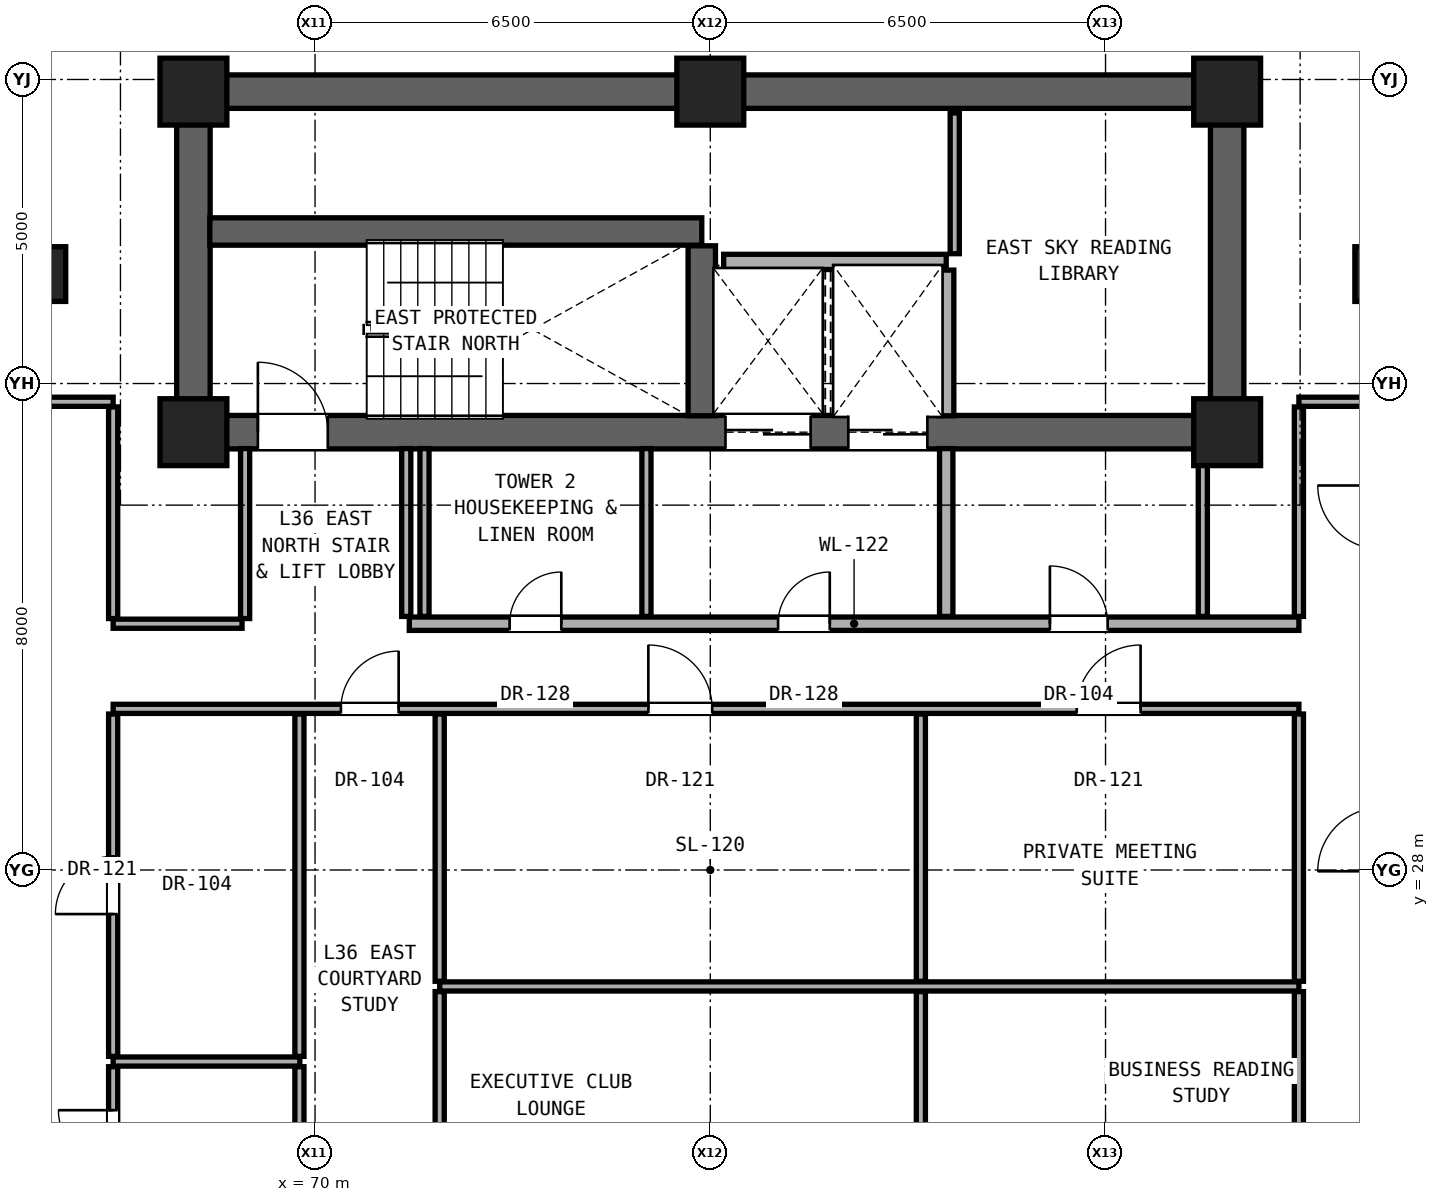
"""IFC4 building model, lengths in metres.
Left out: names, types, materials, properties, quantities, classifications, styles, units other than length and angle.
Written with IfcOpenShell. Run it as: python <this file> out.ifc"""

import sys

from ifc_helpers import new_model, si_unit, direction, frame, frame_2d, origin, origin_2d, place, context, subcontext, project, spatial, rectangle, extrude, element, fill, save


model = new_model("IFC4")
c1 = context("Model", 3, precision=1e-05, world=origin(), true_north=direction((0.0, 1.0)))
c2 = subcontext(c1, "Body", "Model", "MODEL_VIEW")
j1 = project(units=[si_unit("LENGTHUNIT", "METRE"), si_unit("PLANEANGLEUNIT", "RADIAN")], contexts=[c1])
p1 = place(None, origin())
s1 = spatial("IfcSite", under=j1, at=p1, CompositionType="ELEMENT")
p2 = place(p1, origin())
s2 = spatial("IfcBuilding", under=s1, at=p2, CompositionType="ELEMENT")
p3 = place(p2, frame((0.0, 0.0, 128.0)))
s3 = spatial("IfcBuildingStorey", under=s2, at=p3, CompositionType="ELEMENT", Elevation=128.0)
for number, where, z_axis, x_axis in (
    (1, (68.0, 35.2, 0.0), (0.0, 0.0, 1.0), (1.0, 0.0, 0.0)),
    (2, (85.0, 35.2, 0.0), (0.0, 0.0, 1.0), (1.0, 0.0, 0.0)),
    (3, (68.0, 40.8, 0.0), (0.0, 0.0, 1.0), (1.0, 0.0, 0.0)),
    (4, (76.5, 40.8, 0.0), (0.0, 0.0, 1.0), (1.0, 0.0, 0.0)),
    (5, (85.0, 40.8, 0.0), (0.0, 0.0, 1.0), (1.0, 0.0, 0.0)),
):
    element("IfcColumn", number, at=place(p3, frame(where, z_axis=z_axis, x_axis=x_axis)), inside=s3, PredefinedType="COLUMN", context=c2, shape_type="SweptSolid", body=[
        extrude(rectangle(XDim=1.1, YDim=1.1, at=origin_2d()), origin(), (0.0, 0.0, 1.0), 3.3),
    ])
for number, where, z_axis, x_axis in (
    (6, (65.6, 37.8, 0.0), (0.0, 0.0, 1.0), (1.0, 0.0, 0.0)),
    (7, (87.4, 37.8, 0.0), (0.0, 0.0, 1.0), (1.0, 0.0, 0.0)),
):
    element("IfcColumn", number, at=place(p3, frame(where, z_axis=z_axis, x_axis=x_axis)), inside=s3, PredefinedType="PILASTER", context=c2, shape_type="SweptSolid", body=[
        extrude(rectangle(XDim=0.6, YDim=0.9, at=origin_2d()), origin(), (0.0, 0.0, 1.0), 3.3),
    ])
p4 = place(p3, frame((68.0, 40.8, 0.0), z_axis=(0.0, 0.0, 1.0), x_axis=(1.0, 0.0, 0.0)))
e8 = element("IfcWall", 8, at=p4, inside=s3, PredefinedType="SHEAR", context=c2, shape_type="SweptSolid", body=[
    extrude(rectangle(XDim=17.0, YDim=0.55, at=frame_2d((8.5, 0.0))), origin(), (0.0, 0.0, 1.0), 3.08),
])
for number, where, z_axis, x_axis in (
    (9, (68.0, 35.2, 0.0), (0.0, 0.0, 1.0), (0.0, 1.0, 0.0)),
    (10, (85.0, 35.2, 0.0), (0.0, 0.0, 1.0), (0.0, 1.0, 0.0)),
):
    element("IfcWall", number, at=place(p3, frame(where, z_axis=z_axis, x_axis=x_axis)), inside=s3, PredefinedType="SHEAR", context=c2, shape_type="SweptSolid", body=[
        extrude(rectangle(XDim=5.6, YDim=0.55, at=frame_2d((2.8, 0.0))), origin(), (0.0, 0.0, 1.0), 3.08),
    ])
p5 = place(p3, frame((68.0, 35.2, 0.0), z_axis=(0.0, 0.0, 1.0), x_axis=(1.0, 0.0, 0.0)))
e11 = element("IfcWall", 11, at=p5, inside=s3, PredefinedType="SHEAR", context=c2, shape_type="SweptSolid", body=[
    extrude(rectangle(XDim=17.0, YDim=0.55, at=frame_2d((8.5, 0.0))), origin(), (0.0, 0.0, 1.0), 3.08),
])
p6 = place(p5, frame((1.06, 0.0, 0.0)))
e12 = element("IfcOpeningElement", 12, at=p6, cuts=e11, PredefinedType="OPENING", context=c2, shape_type="SweptSolid", body=[
    extrude(rectangle(XDim=1.15, YDim=2.2, at=frame_2d((0.575, 1.1))), frame((0.0, 0.285, 0.0), z_axis=(0.0, -1.0, 0.0), x_axis=(1.0, 0.0, 0.0)), (0.0, 0.0, 1.0), 0.57),
])
p7 = place(p5, frame((8.75, 0.0, 0.0)))
e13 = element("IfcOpeningElement", 13, at=p7, cuts=e11, PredefinedType="OPENING", context=c2, shape_type="SweptSolid", body=[
    extrude(rectangle(XDim=1.4, YDim=2.35, at=frame_2d((0.7, 1.175))), frame((0.0, 0.285, 0.0), z_axis=(0.0, -1.0, 0.0), x_axis=(1.0, 0.0, 0.0)), (0.0, 0.0, 1.0), 0.57),
])
p8 = place(p5, frame((10.77, 0.0, 0.0)))
e14 = element("IfcOpeningElement", 14, at=p8, cuts=e11, PredefinedType="OPENING", context=c2, shape_type="SweptSolid", body=[
    extrude(rectangle(XDim=1.3, YDim=2.3, at=frame_2d((0.65, 1.15))), frame((0.0, 0.285, 0.0), z_axis=(0.0, -1.0, 0.0), x_axis=(1.0, 0.0, 0.0)), (0.0, 0.0, 1.0), 0.57),
])
p9 = place(p3, frame((66.68, 24.85, 0.0), z_axis=(0.0, 0.0, 1.0), x_axis=(1.0, 0.0, 0.0)))
e15 = element("IfcWall", 15, at=p9, inside=s3, PredefinedType="PARTITIONING", context=c2, shape_type="SweptSolid", body=[
    extrude(rectangle(XDim=3.07, YDim=0.15, at=frame_2d((1.535, 0.0))), origin(), (0.0, 0.0, 1.0), 2.216),
])
p10 = place(p3, frame((72.05, 26.085, 0.0), z_axis=(0.0, 0.0, 1.0), x_axis=(1.0, 0.0, 0.0)))
e16 = element("IfcWall", 16, at=p10, inside=s3, PredefinedType="PARTITIONING", context=c2, shape_type="SweptSolid", body=[
    extrude(rectangle(XDim=14.13, YDim=0.15, at=frame_2d((7.065, 0.0))), origin(), (0.0, 0.0, 1.0), 2.216),
])
p11 = place(p3, frame((66.68, 30.65, 0.0), z_axis=(0.0, 0.0, 1.0), x_axis=(1.0, 0.0, 0.0)))
e17 = element("IfcWall", 17, at=p11, inside=s3, PredefinedType="PARTITIONING", context=c2, shape_type="SweptSolid", body=[
    extrude(rectangle(XDim=19.5, YDim=0.15, at=frame_2d((9.75, 0.0))), origin(), (0.0, 0.0, 1.0), 2.216),
])
p12 = place(p11, frame((3.745, 0.0, 0.0)))
e18 = element("IfcOpeningElement", 18, at=p12, cuts=e17, PredefinedType="OPENING", context=c2, shape_type="SweptSolid", body=[
    extrude(rectangle(XDim=0.95, YDim=2.15, at=frame_2d((0.475, 1.075))), frame((0.0, 0.085, 0.0), z_axis=(0.0, -1.0, 0.0), x_axis=(1.0, 0.0, 0.0)), (0.0, 0.0, 1.0), 0.17),
])
p13 = place(p11, frame((8.802, 0.0, 0.0)))
e19 = element("IfcOpeningElement", 19, at=p13, cuts=e17, PredefinedType="OPENING", context=c2, shape_type="SweptSolid", body=[
    extrude(rectangle(XDim=1.05, YDim=2.2, at=frame_2d((0.525, 1.1))), frame((0.0, 0.085, 0.0), z_axis=(0.0, -1.0, 0.0), x_axis=(1.0, 0.0, 0.0)), (0.0, 0.0, 1.0), 0.17),
])
p14 = place(p11, frame((15.846, 0.0, 0.0)))
e20 = element("IfcOpeningElement", 20, at=p14, cuts=e17, PredefinedType="OPENING", context=c2, shape_type="SweptSolid", body=[
    extrude(rectangle(XDim=1.05, YDim=2.2, at=frame_2d((0.525, 1.1))), frame((0.0, 0.085, 0.0), z_axis=(0.0, -1.0, 0.0), x_axis=(1.0, 0.0, 0.0)), (0.0, 0.0, 1.0), 0.17),
])
p15 = place(p3, frame((66.68, 32.05, 0.0), z_axis=(0.0, 0.0, 1.0), x_axis=(1.0, 0.0, 0.0)))
e21 = element("IfcWall", 21, at=p15, inside=s3, PredefinedType="PARTITIONING", context=c2, shape_type="SweptSolid", body=[
    extrude(rectangle(XDim=2.12, YDim=0.15, at=frame_2d((1.06, 0.0))), origin(), (0.0, 0.0, 1.0), 2.216),
])
p16 = place(p3, frame((71.55, 32.05, 0.0), z_axis=(0.0, 0.0, 1.0), x_axis=(1.0, 0.0, 0.0)))
e22 = element("IfcWall", 22, at=p16, inside=s3, PredefinedType="SOLIDWALL", context=c2, shape_type="SweptSolid", body=[
    extrude(rectangle(XDim=14.63, YDim=0.22, at=frame_2d((7.315, 0.0))), origin(), (0.0, 0.0, 1.0), 2.216),
])
p17 = place(p16, frame((6.065, 0.0, 0.0)))
e23 = element("IfcOpeningElement", 23, at=p17, cuts=e22, PredefinedType="OPENING", context=c2, shape_type="SweptSolid", body=[
    extrude(rectangle(XDim=0.85, YDim=2.01, at=frame_2d((0.425, 1.005))), frame((0.0, 0.12, 0.0), z_axis=(0.0, -1.0, 0.0), x_axis=(1.0, 0.0, 0.0)), (0.0, 0.0, 1.0), 0.24),
])
p18 = place(p16, frame((10.535, 0.0, 0.0)))
e24 = element("IfcOpeningElement", 24, at=p18, cuts=e22, PredefinedType="OPENING", context=c2, shape_type="SweptSolid", body=[
    extrude(rectangle(XDim=0.95, YDim=2.15, at=frame_2d((0.475, 1.075))), frame((0.0, 0.12, 0.0), z_axis=(0.0, -1.0, 0.0), x_axis=(1.0, 0.0, 0.0)), (0.0, 0.0, 1.0), 0.24),
])
p19 = place(p16, frame((1.65, 0.0, 0.0)))
e25 = element("IfcOpeningElement", 25, at=p19, cuts=e22, PredefinedType="OPENING", context=c2, shape_type="SweptSolid", body=[
    extrude(rectangle(XDim=0.85, YDim=2.01, at=frame_2d((0.425, 1.005))), frame((0.0, 0.12, 0.0), z_axis=(0.0, -1.0, 0.0), x_axis=(1.0, 0.0, 0.0)), (0.0, 0.0, 1.0), 0.24),
])
p20 = place(p3, frame((65.32, 35.7, 0.0), z_axis=(0.0, 0.0, 1.0), x_axis=(1.0, 0.0, 0.0)))
e26 = element("IfcWall", 26, at=p20, inside=s3, PredefinedType="PARTITIONING", context=c2, shape_type="SweptSolid", body=[
    extrude(rectangle(XDim=1.36, YDim=0.15, at=frame_2d((0.68, 0.0))), origin(), (0.0, 0.0, 1.0), 3.08),
])
p21 = place(p3, frame((86.18, 35.7, 0.0), z_axis=(0.0, 0.0, 1.0), x_axis=(1.0, 0.0, 0.0)))
e27 = element("IfcWall", 27, at=p21, inside=s3, PredefinedType="PARTITIONING", context=c2, shape_type="SweptSolid", body=[
    extrude(rectangle(XDim=1.36, YDim=0.15, at=frame_2d((0.68, 0.0))), origin(), (0.0, 0.0, 1.0), 3.08),
])
p22 = place(p3, frame((76.72, 38.0, 0.0), z_axis=(0.0, 0.0, 1.0), x_axis=(1.0, 0.0, 0.0)))
e28 = element("IfcWall", 28, at=p22, inside=s3, PredefinedType="SOLIDWALL", context=c2, shape_type="SweptSolid", body=[
    extrude(rectangle(XDim=3.66, YDim=0.25, at=frame_2d((1.83, 0.0))), origin(), (0.0, 0.0, 1.0), 3.08),
])
p23 = place(p3, frame((68.27, 38.5, 0.0), z_axis=(0.0, 0.0, 1.0), x_axis=(1.0, 0.0, 0.0)))
e29 = element("IfcWall", 29, at=p23, inside=s3, PredefinedType="SHEAR", context=c2, shape_type="SweptSolid", body=[
    extrude(rectangle(XDim=8.09, YDim=0.45, at=frame_2d((4.045, 0.0))), origin(), (0.0, 0.0, 1.0), 3.08),
])
p24 = place(p3, frame((66.68, 22.435, 0.0), z_axis=(0.0, 0.0, 1.0), x_axis=(0.0, 1.0, 0.0)))
e30 = element("IfcWall", 30, at=p24, inside=s3, PredefinedType="PARTITIONING", context=c2, shape_type="SweptSolid", body=[
    extrude(rectangle(XDim=2.33, YDim=0.15, at=frame_2d((1.165, 0.0))), origin(), (0.0, 0.0, 1.0), 3.08),
])
p25 = place(p24, frame((0.715, 0.0, 0.0)))
e31 = element("IfcOpeningElement", 31, at=p25, cuts=e30, PredefinedType="OPENING", context=c2, shape_type="SweptSolid", body=[
    extrude(rectangle(XDim=0.9, YDim=2.1, at=frame_2d((0.45, 1.05))), frame((0.0, 0.085, 0.0), z_axis=(0.0, -1.0, 0.0), x_axis=(1.0, 0.0, 0.0)), (0.0, 0.0, 1.0), 0.17),
])
p26 = place(p3, frame((66.68, 24.935, 0.0), z_axis=(0.0, 0.0, 1.0), x_axis=(0.0, 1.0, 0.0)))
e32 = element("IfcWall", 32, at=p26, inside=s3, PredefinedType="PARTITIONING", context=c2, shape_type="SweptSolid", body=[
    extrude(rectangle(XDim=5.63, YDim=0.15, at=frame_2d((2.815, 0.0))), origin(), (0.0, 0.0, 1.0), 2.376),
])
p27 = place(p26, frame((2.34, 0.0, 0.0)))
e33 = element("IfcOpeningElement", 33, at=p27, cuts=e32, PredefinedType="OPENING", context=c2, shape_type="SweptSolid", body=[
    extrude(rectangle(XDim=0.95, YDim=2.15, at=frame_2d((0.475, 1.075))), frame((0.0, 0.085, 0.0), z_axis=(0.0, -1.0, 0.0), x_axis=(1.0, 0.0, 0.0)), (0.0, 0.0, 1.0), 0.17),
])
p28 = place(p3, frame((66.68, 32.135, 0.0), z_axis=(0.0, 0.0, 1.0), x_axis=(0.0, 1.0, 0.0)))
e34 = element("IfcWall", 34, at=p28, inside=s3, PredefinedType="PARTITIONING", context=c2, shape_type="SweptSolid", body=[
    extrude(rectangle(XDim=3.48, YDim=0.15, at=frame_2d((1.74, 0.0))), origin(), (0.0, 0.0, 1.0), 2.472),
])
p29 = place(p3, frame((68.85, 32.135, 0.0), z_axis=(0.0, 0.0, 1.0), x_axis=(0.0, 1.0, 0.0)))
e35 = element("IfcWall", 35, at=p29, inside=s3, PredefinedType="PARTITIONING", context=c2, shape_type="SweptSolid", body=[
    extrude(rectangle(XDim=2.795, YDim=0.15, at=frame_2d((1.397, 0.0))), origin(), (0.0, 0.0, 1.0), 3.08),
])
p30 = place(p3, frame((69.743, 22.435, 0.0), z_axis=(0.0, 0.0, 1.0), x_axis=(0.0, 1.0, 0.0)))
e36 = element("IfcWall", 36, at=p30, inside=s3, PredefinedType="PARTITIONING", context=c2, shape_type="SweptSolid", body=[
    extrude(rectangle(XDim=2.33, YDim=0.15, at=frame_2d((1.165, 0.0))), origin(), (0.0, 0.0, 1.0), 3.08),
])
p31 = place(p3, frame((69.743, 24.935, 0.0), z_axis=(0.0, 0.0, 1.0), x_axis=(0.0, 1.0, 0.0)))
e37 = element("IfcWall", 37, at=p31, inside=s3, PredefinedType="PARTITIONING", context=c2, shape_type="SweptSolid", body=[
    extrude(rectangle(XDim=5.63, YDim=0.15, at=frame_2d((2.815, 0.0))), origin(), (0.0, 0.0, 1.0), 2.216),
])
for number, where, z_axis, x_axis in (
    (38, (71.5, 32.17, 0.0), (0.0, 0.0, 1.0), (0.0, 1.0, 0.0)),
    (39, (71.8, 32.17, 0.0), (0.0, 0.0, 1.0), (0.0, 1.0, 0.0)),
):
    element("IfcWall", number, at=place(p3, frame(where, z_axis=z_axis, x_axis=x_axis)), inside=s3, PredefinedType="PARTITIONING", context=c2, shape_type="SweptSolid", body=[
        extrude(rectangle(XDim=2.76, YDim=0.15, at=frame_2d((1.38, 0.0))), origin(), (0.0, 0.0, 1.0), 3.08),
    ])
p32 = place(p3, frame((72.05, 22.435, 0.0), z_axis=(0.0, 0.0, 1.0), x_axis=(0.0, 1.0, 0.0)))
e40 = element("IfcWall", 40, at=p32, inside=s3, PredefinedType="PARTITIONING", context=c2, shape_type="SweptSolid", body=[
    extrude(rectangle(XDim=3.565, YDim=0.15, at=frame_2d((1.782, 0.0))), origin(), (0.0, 0.0, 1.0), 3.08),
])
p33 = place(p3, frame((72.05, 26.17, 0.0), z_axis=(0.0, 0.0, 1.0), x_axis=(0.0, 1.0, 0.0)))
e41 = element("IfcWall", 41, at=p33, inside=s3, PredefinedType="PARTITIONING", context=c2, shape_type="SweptSolid", body=[
    extrude(rectangle(XDim=4.395, YDim=0.15, at=frame_2d((2.198, 0.0))), origin(), (0.0, 0.0, 1.0), 2.216),
])
p34 = place(p3, frame((75.45, 32.17, 0.0), z_axis=(0.0, 0.0, 1.0), x_axis=(0.0, 1.0, 0.0)))
e42 = element("IfcWall", 42, at=p34, inside=s3, PredefinedType="PARTITIONING", context=c2, shape_type="SweptSolid", body=[
    extrude(rectangle(XDim=2.76, YDim=0.15, at=frame_2d((1.38, 0.0))), origin(), (0.0, 0.0, 1.0), 3.08),
])
p35 = place(p3, frame((76.36, 35.47, 0.0), z_axis=(0.0, 0.0, 1.0), x_axis=(0.0, 1.0, 0.0)))
e43 = element("IfcWall", 43, at=p35, inside=s3, PredefinedType="SHEAR", context=c2, shape_type="SweptSolid", body=[
    extrude(rectangle(XDim=2.795, YDim=0.45, at=frame_2d((1.397, 0.0))), origin(), (0.0, 0.0, 1.0), 3.08),
])
p36 = place(p3, frame((79.963, 22.435, 0.0), z_axis=(0.0, 0.0, 1.0), x_axis=(0.0, 1.0, 0.0)))
e44 = element("IfcWall", 44, at=p36, inside=s3, PredefinedType="PARTITIONING", context=c2, shape_type="SweptSolid", body=[
    extrude(rectangle(XDim=3.565, YDim=0.15, at=frame_2d((1.782, 0.0))), origin(), (0.0, 0.0, 1.0), 3.08),
])
p37 = place(p3, frame((79.963, 26.17, 0.0), z_axis=(0.0, 0.0, 1.0), x_axis=(0.0, 1.0, 0.0)))
e45 = element("IfcWall", 45, at=p37, inside=s3, PredefinedType="PARTITIONING", context=c2, shape_type="SweptSolid", body=[
    extrude(rectangle(XDim=4.395, YDim=0.15, at=frame_2d((2.198, 0.0))), origin(), (0.0, 0.0, 1.0), 2.216),
])
p38 = place(p3, frame((80.38, 32.17, 0.0), z_axis=(0.0, 0.0, 1.0), x_axis=(0.0, 1.0, 0.0)))
e46 = element("IfcWall", 46, at=p38, inside=s3, PredefinedType="SOLIDWALL", context=c2, shape_type="SweptSolid", body=[
    extrude(rectangle(XDim=2.76, YDim=0.22, at=frame_2d((1.38, 0.0))), origin(), (0.0, 0.0, 1.0), 3.08),
])
p39 = place(p3, frame((80.38, 35.47, 0.0), z_axis=(0.0, 0.0, 1.0), x_axis=(0.0, 1.0, 0.0)))
e47 = element("IfcWall", 47, at=p39, inside=s3, PredefinedType="SOLIDWALL", context=c2, shape_type="SweptSolid", body=[
    extrude(rectangle(XDim=2.395, YDim=0.25, at=frame_2d((1.198, 0.0))), origin(), (0.0, 0.0, 1.0), 3.08),
])
p40 = place(p3, frame((80.52, 38.135, 0.0), z_axis=(0.0, 0.0, 1.0), x_axis=(0.0, 1.0, 0.0)))
e48 = element("IfcWall", 48, at=p40, inside=s3, PredefinedType="PARTITIONING", context=c2, shape_type="SweptSolid", body=[
    extrude(rectangle(XDim=2.315, YDim=0.15, at=frame_2d((1.157, 0.0))), origin(), (0.0, 0.0, 1.0), 3.08),
])
p41 = place(p3, frame((84.6, 32.17, 0.0), z_axis=(0.0, 0.0, 1.0), x_axis=(0.0, 1.0, 0.0)))
e49 = element("IfcWall", 49, at=p41, inside=s3, PredefinedType="PARTITIONING", context=c2, shape_type="SweptSolid", body=[
    extrude(rectangle(XDim=2.76, YDim=0.15, at=frame_2d((1.38, 0.0))), origin(), (0.0, 0.0, 1.0), 3.08),
])
p42 = place(p3, frame((86.18, 22.435, 0.0), z_axis=(0.0, 0.0, 1.0), x_axis=(0.0, 1.0, 0.0)))
e50 = element("IfcWall", 50, at=p42, inside=s3, PredefinedType="PARTITIONING", context=c2, shape_type="SweptSolid", body=[
    extrude(rectangle(XDim=3.565, YDim=0.15, at=frame_2d((1.782, 0.0))), origin(), (0.0, 0.0, 1.0), 3.08),
])
p43 = place(p3, frame((86.18, 26.17, 0.0), z_axis=(0.0, 0.0, 1.0), x_axis=(0.0, 1.0, 0.0)))
e51 = element("IfcWall", 51, at=p43, inside=s3, PredefinedType="PARTITIONING", context=c2, shape_type="SweptSolid", body=[
    extrude(rectangle(XDim=4.395, YDim=0.15, at=frame_2d((2.198, 0.0))), origin(), (0.0, 0.0, 1.0), 2.376),
])
p44 = place(p3, frame((86.18, 32.17, 0.0), z_axis=(0.0, 0.0, 1.0), x_axis=(0.0, 1.0, 0.0)))
e52 = element("IfcWall", 52, at=p44, inside=s3, PredefinedType="PARTITIONING", context=c2, shape_type="SweptSolid", body=[
    extrude(rectangle(XDim=3.445, YDim=0.15, at=frame_2d((1.723, 0.0))), origin(), (0.0, 0.0, 1.0), 2.472),
])
p45 = place(p6, origin())
e53 = element("IfcDoor", 53, at=p45, inside=s3, OperationType="SINGLE_SWING_LEFT", PredefinedType="DOOR", context=c2, shape_type="SweptSolid", body=[
    extrude(rectangle(XDim=1.15, YDim=2.2, at=frame_2d((0.575, 1.1))), frame((0.0, 0.025, 0.0), z_axis=(0.0, -1.0, 0.0), x_axis=(1.0, 0.0, 0.0)), (0.0, 0.0, 1.0), 0.05),
])
fill(e12, e53)
p46 = place(p17, origin())
e54 = element("IfcDoor", 54, at=p46, inside=s3, OperationType="SINGLE_SWING_RIGHT", PredefinedType="DOOR", context=c2, shape_type="SweptSolid", body=[
    extrude(rectangle(XDim=0.85, YDim=2.01, at=frame_2d((0.425, 1.005))), frame((0.0, 0.025, 0.0), z_axis=(0.0, -1.0, 0.0), x_axis=(1.0, 0.0, 0.0)), (0.0, 0.0, 1.0), 0.05),
])
fill(e23, e54)
p47 = place(p18, origin())
e55 = element("IfcDoor", 55, at=p47, inside=s3, OperationType="SINGLE_SWING_LEFT", PredefinedType="DOOR", context=c2, shape_type="SweptSolid", body=[
    extrude(rectangle(XDim=0.95, YDim=2.15, at=frame_2d((0.475, 1.075))), frame((0.0, 0.025, 0.0), z_axis=(0.0, -1.0, 0.0), x_axis=(1.0, 0.0, 0.0)), (0.0, 0.0, 1.0), 0.05),
])
fill(e24, e55)
p48 = place(p19, origin())
e56 = element("IfcDoor", 56, at=p48, inside=s3, OperationType="SINGLE_SWING_RIGHT", PredefinedType="DOOR", context=c2, shape_type="SweptSolid", body=[
    extrude(rectangle(XDim=0.85, YDim=2.01, at=frame_2d((0.425, 1.005))), frame((0.0, 0.025, 0.0), z_axis=(0.0, -1.0, 0.0), x_axis=(1.0, 0.0, 0.0)), (0.0, 0.0, 1.0), 0.05),
])
fill(e25, e56)
p49 = place(p25, origin())
e57 = element("IfcDoor", 57, at=p49, inside=s3, OperationType="SINGLE_SWING_RIGHT", PredefinedType="DOOR", context=c2, shape_type="SweptSolid", body=[
    extrude(rectangle(XDim=0.9, YDim=2.1, at=frame_2d((0.45, 1.05))), frame((0.0, 0.025, 0.0), z_axis=(0.0, -1.0, 0.0), x_axis=(1.0, 0.0, 0.0)), (0.0, 0.0, 1.0), 0.05),
])
fill(e31, e57)
p50 = place(p27, origin())
e58 = element("IfcDoor", 58, at=p50, inside=s3, OperationType="SINGLE_SWING_LEFT", PredefinedType="DOOR", context=c2, shape_type="SweptSolid", body=[
    extrude(rectangle(XDim=0.95, YDim=2.15, at=frame_2d((0.475, 1.075))), frame((0.0, 0.025, 0.0), z_axis=(0.0, -1.0, 0.0), x_axis=(1.0, 0.0, 0.0)), (0.0, 0.0, 1.0), 0.05),
])
fill(e33, e58)
p51 = place(p12, origin())
e59 = element("IfcDoor", 59, at=p51, inside=s3, OperationType="SINGLE_SWING_RIGHT", PredefinedType="DOOR", context=c2, shape_type="SweptSolid", body=[
    extrude(rectangle(XDim=0.95, YDim=2.15, at=frame_2d((0.475, 1.075))), frame((0.0, 0.025, 0.0), z_axis=(0.0, -1.0, 0.0), x_axis=(1.0, 0.0, 0.0)), (0.0, 0.0, 1.0), 0.05),
])
fill(e18, e59)
p52 = place(p13, origin())
e60 = element("IfcDoor", 60, at=p52, inside=s3, OperationType="SINGLE_SWING_LEFT", PredefinedType="DOOR", context=c2, shape_type="SweptSolid", body=[
    extrude(rectangle(XDim=1.05, YDim=2.2, at=frame_2d((0.525, 1.1))), frame((0.0, 0.025, 0.0), z_axis=(0.0, -1.0, 0.0), x_axis=(1.0, 0.0, 0.0)), (0.0, 0.0, 1.0), 0.05),
])
fill(e19, e60)
p53 = place(p14, origin())
e61 = element("IfcDoor", 61, at=p53, inside=s3, OperationType="SINGLE_SWING_RIGHT", PredefinedType="DOOR", context=c2, shape_type="SweptSolid", body=[
    extrude(rectangle(XDim=1.05, YDim=2.2, at=frame_2d((0.525, 1.1))), frame((0.0, 0.025, 0.0), z_axis=(0.0, -1.0, 0.0), x_axis=(1.0, 0.0, 0.0)), (0.0, 0.0, 1.0), 0.05),
])
fill(e20, e61)
p54 = place(p7, origin())
e62 = element("IfcDoor", 62, at=p54, inside=s3, OperationType="DOUBLE_DOOR_SLIDING", PredefinedType="DOOR", context=c2, shape_type="SweptSolid", body=[
    extrude(rectangle(XDim=1.4, YDim=2.35, at=frame_2d((0.7, 1.175))), frame((0.0, 0.025, 0.0), z_axis=(0.0, -1.0, 0.0), x_axis=(1.0, 0.0, 0.0)), (0.0, 0.0, 1.0), 0.05),
])
fill(e13, e62)
p55 = place(p8, origin())
e63 = element("IfcDoor", 63, at=p55, inside=s3, OperationType="DOUBLE_DOOR_SLIDING", PredefinedType="DOOR", context=c2, shape_type="SweptSolid", body=[
    extrude(rectangle(XDim=1.3, YDim=2.3, at=frame_2d((0.65, 1.15))), frame((0.0, 0.025, 0.0), z_axis=(0.0, -1.0, 0.0), x_axis=(1.0, 0.0, 0.0)), (0.0, 0.0, 1.0), 0.05),
])
fill(e14, e63)
save(model, sys.argv[1])
